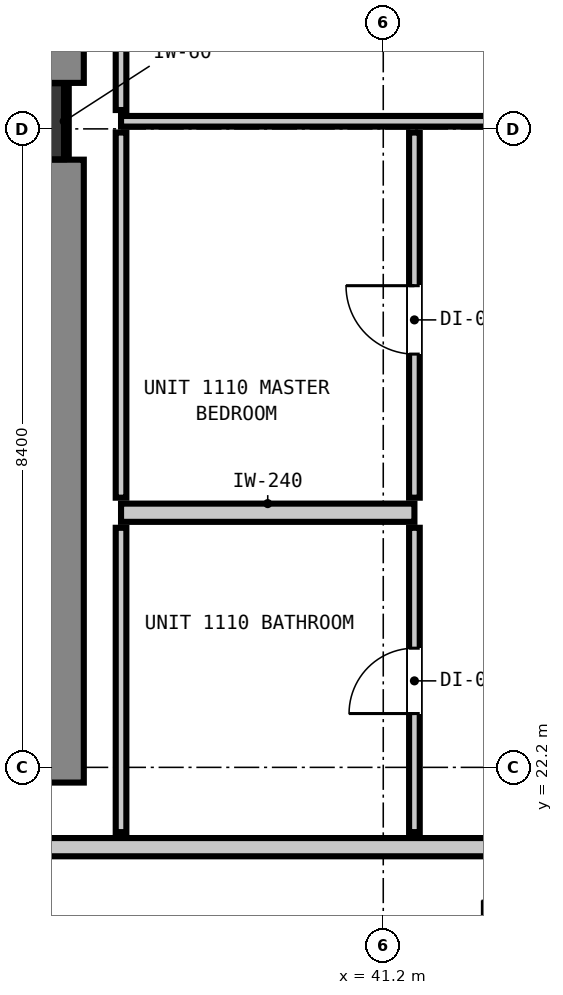
"""IFC4 building model, lengths in metres.
Left out: names, types, materials, properties, quantities, classifications, styles, units other than length and angle.
Written with IfcOpenShell. Run it as: python <this file> out.ifc"""

import sys

from ifc_helpers import new_model, si_unit, direction, frame, frame_2d, origin, origin_2d, place, context, subcontext, project, spatial, rectangle, extrude, element, fill, save


model = new_model("IFC4")
c1 = context("Model", 3, precision=1e-05, world=origin(), true_north=direction((0.0, 1.0)))
c2 = subcontext(c1, "Body", "Model", "MODEL_VIEW")
j1 = project(units=[si_unit("LENGTHUNIT", "METRE"), si_unit("PLANEANGLEUNIT", "RADIAN")], contexts=[c1])
p1 = place(None, origin())
s1 = spatial("IfcSite", under=j1, at=p1, CompositionType="ELEMENT")
p2 = place(p1, origin())
s2 = spatial("IfcBuilding", under=s1, at=p2, CompositionType="ELEMENT")
p3 = place(p2, frame((0.0, 0.0, 41.92)))
s3 = spatial("IfcBuildingStorey", under=s2, at=p3, CompositionType="ELEMENT", Elevation=41.92)
p4 = place(p3, frame((36.5, 30.7, 0.0), z_axis=(0.0, 0.0, 1.0), x_axis=(1.0, 0.0, 0.0)))
e1 = element("IfcColumn", 1, at=p4, inside=s3, PredefinedType="COLUMN", context=c2, shape_type="SweptSolid", body=[
    extrude(rectangle(XDim=1.0, YDim=1.0, at=origin_2d()), origin(), (0.0, 0.0, 1.0), 3.32),
])
p5 = place(p3, frame((36.66, 22.0, 0.0), z_axis=(0.0, 0.0, 1.0), x_axis=(0.0, 1.0, 0.0)))
e2 = element("IfcWall", 2, at=p5, inside=s3, PredefinedType="SHEAR", context=c2, shape_type="SweptSolid", body=[
    extrude(rectangle(XDim=8.195, YDim=1.2, at=frame_2d((4.098, 0.0))), origin(), (0.0, 0.0, 1.0), 3.32),
])
p6 = place(p3, frame((36.66, 31.205, 0.0), z_axis=(0.0, 0.0, 1.0), x_axis=(0.0, 1.0, 0.0)))
e3 = element("IfcWall", 3, at=p6, inside=s3, PredefinedType="SHEAR", context=c2, shape_type="SweptSolid", body=[
    extrude(rectangle(XDim=8.195, YDim=1.2, at=frame_2d((4.097, 0.0))), origin(), (0.0, 0.0, 1.0), 3.32),
])
p7 = place(p3, frame((10.15, 21.15, 0.0), z_axis=(0.0, 0.0, 1.0), x_axis=(1.0, 0.0, 0.0)))
e4 = element("IfcWall", 4, at=p7, inside=s3, PredefinedType="PARTITIONING", context=c2, shape_type="SweptSolid", body=[
    extrude(rectangle(XDim=40.023, YDim=0.24, at=frame_2d((20.012, 0.0))), origin(), (0.0, 0.0, 1.0), 3.06),
])
p8 = place(p7, frame((8.06, 0.0, 0.0)))
e5 = element("IfcOpeningElement", 5, at=p8, cuts=e4, PredefinedType="OPENING", context=c2, shape_type="SweptSolid", body=[
    extrude(rectangle(XDim=1.1, YDim=2.15, at=frame_2d((0.55, 1.075))), frame((0.0, 0.13, 0.0), z_axis=(0.0, -1.0, 0.0), x_axis=(1.0, 0.0, 0.0)), (0.0, 0.0, 1.0), 0.26),
])
p9 = place(p7, frame((0.324, 0.0, 0.0)))
e6 = element("IfcOpeningElement", 6, at=p9, cuts=e4, PredefinedType="OPENING", context=c2, shape_type="SweptSolid", body=[
    extrude(rectangle(XDim=1.4, YDim=2.15, at=frame_2d((0.7, 1.075))), frame((0.0, 0.13, 0.0), z_axis=(0.0, -1.0, 0.0), x_axis=(1.0, 0.0, 0.0)), (0.0, 0.0, 1.0), 0.26),
])
p10 = place(p7, frame((33.574, 0.0, 0.0)))
e7 = element("IfcOpeningElement", 7, at=p10, cuts=e4, PredefinedType="OPENING", context=c2, shape_type="SweptSolid", body=[
    extrude(rectangle(XDim=1.0, YDim=2.15, at=frame_2d((0.5, 1.075))), frame((0.0, 0.13, 0.0), z_axis=(0.0, -1.0, 0.0), x_axis=(1.0, 0.0, 0.0)), (0.0, 0.0, 1.0), 0.26),
])
p11 = place(p3, frame((37.75, 25.55, 0.0), z_axis=(0.0, 0.0, 1.0), x_axis=(1.0, 0.0, 0.0)))
e8 = element("IfcWall", 8, at=p11, inside=s3, PredefinedType="PARTITIONING", context=c2, shape_type="SweptSolid", body=[
    extrude(rectangle(XDim=3.86, YDim=0.24, at=frame_2d((1.93, 0.0))), origin(), (0.0, 0.0, 1.0), 3.06),
])
p12 = place(p3, frame((37.75, 30.7, 0.0), z_axis=(0.0, 0.0, 1.0), x_axis=(1.0, 0.0, 0.0)))
e9 = element("IfcWall", 9, at=p12, inside=s3, PredefinedType="PARTITIONING", context=c2, shape_type="SweptSolid", body=[
    extrude(rectangle(XDim=11.318, YDim=0.14, at=frame_2d((5.659, 0.0))), origin(), (0.0, 0.0, 1.0), 2.295),
])
p13 = place(p3, frame((37.75, 21.348, 0.0), z_axis=(0.0, 0.0, 1.0), x_axis=(0.0, 1.0, 0.0)))
e10 = element("IfcWall", 10, at=p13, inside=s3, PredefinedType="PARTITIONING", context=c2, shape_type="SweptSolid", body=[
    extrude(rectangle(XDim=4.004, YDim=0.14, at=frame_2d((2.002, 0.0))), origin(), (0.0, 0.0, 1.0), 3.06),
])
p14 = place(p3, frame((37.75, 25.748, 0.0), z_axis=(0.0, 0.0, 1.0), x_axis=(0.0, 1.0, 0.0)))
e11 = element("IfcWall", 11, at=p14, inside=s3, PredefinedType="PARTITIONING", context=c2, shape_type="SweptSolid", body=[
    extrude(rectangle(XDim=4.804, YDim=0.14, at=frame_2d((2.402, 0.0))), origin(), (0.0, 0.0, 1.0), 3.06),
])
p15 = place(p3, frame((37.75, 30.848, 0.0), z_axis=(0.0, 0.0, 1.0), x_axis=(0.0, 1.0, 0.0)))
e12 = element("IfcWall", 12, at=p15, inside=s3, PredefinedType="PARTITIONING", context=c2, shape_type="SweptSolid", body=[
    extrude(rectangle(XDim=5.034, YDim=0.14, at=frame_2d((2.517, 0.0))), origin(), (0.0, 0.0, 1.0), 3.06),
])
p16 = place(p3, frame((41.61, 21.348, 0.0), z_axis=(0.0, 0.0, 1.0), x_axis=(0.0, 1.0, 0.0)))
e13 = element("IfcWall", 13, at=p16, inside=s3, PredefinedType="PARTITIONING", context=c2, shape_type="SweptSolid", body=[
    extrude(rectangle(XDim=4.004, YDim=0.14, at=frame_2d((2.002, 0.0))), origin(), (0.0, 0.0, 1.0), 3.06),
])
p17 = place(p16, frame((1.56, 0.0, 0.0)))
e14 = element("IfcOpeningElement", 14, at=p17, cuts=e13, PredefinedType="OPENING", context=c2, shape_type="SweptSolid", body=[
    extrude(rectangle(XDim=0.86, YDim=2.02, at=frame_2d((0.43, 1.01))), frame((0.0, 0.08, 0.0), z_axis=(0.0, -1.0, 0.0), x_axis=(1.0, 0.0, 0.0)), (0.0, 0.0, 1.0), 0.16),
])
p18 = place(p3, frame((41.61, 25.748, 0.0), z_axis=(0.0, 0.0, 1.0), x_axis=(0.0, 1.0, 0.0)))
e15 = element("IfcWall", 15, at=p18, inside=s3, PredefinedType="PARTITIONING", context=c2, shape_type="SweptSolid", body=[
    extrude(rectangle(XDim=4.804, YDim=0.14, at=frame_2d((2.402, 0.0))), origin(), (0.0, 0.0, 1.0), 3.06),
])
p19 = place(p18, frame((1.889, 0.0, 0.0)))
e16 = element("IfcOpeningElement", 16, at=p19, cuts=e15, PredefinedType="OPENING", context=c2, shape_type="SweptSolid", body=[
    extrude(rectangle(XDim=0.9, YDim=2.1, at=frame_2d((0.45, 1.05))), frame((0.0, 0.08, 0.0), z_axis=(0.0, -1.0, 0.0), x_axis=(1.0, 0.0, 0.0)), (0.0, 0.0, 1.0), 0.16),
])
p20 = place(p3, frame((37.032, 30.21, 0.0), z_axis=(0.0, 0.0, 1.0), x_axis=(0.0, 1.0, 0.0)))
e17 = element("IfcWall", 17, at=p20, inside=s3, PredefinedType="PARTITIONING", context=c2, shape_type="SweptSolid", body=[
    extrude(rectangle(XDim=0.98, YDim=0.06, at=frame_2d((0.49, 0.0))), origin(), (0.0, 0.0, 1.0), 1.45),
])
p21 = place(p17, origin())
e18 = element("IfcDoor", 18, at=p21, inside=s3, OperationType="SINGLE_SWING_LEFT", PredefinedType="DOOR", context=c2, shape_type="SweptSolid", body=[
    extrude(rectangle(XDim=0.86, YDim=2.02, at=frame_2d((0.43, 1.01))), frame((0.0, 0.025, 0.0), z_axis=(0.0, -1.0, 0.0), x_axis=(1.0, 0.0, 0.0)), (0.0, 0.0, 1.0), 0.05),
])
fill(e14, e18)
p22 = place(p19, origin())
e19 = element("IfcDoor", 19, at=p22, inside=s3, OperationType="SINGLE_SWING_RIGHT", PredefinedType="DOOR", context=c2, shape_type="SweptSolid", body=[
    extrude(rectangle(XDim=0.9, YDim=2.1, at=frame_2d((0.45, 1.05))), frame((0.0, 0.025, 0.0), z_axis=(0.0, -1.0, 0.0), x_axis=(1.0, 0.0, 0.0)), (0.0, 0.0, 1.0), 0.05),
])
fill(e16, e19)
save(model, sys.argv[1])
